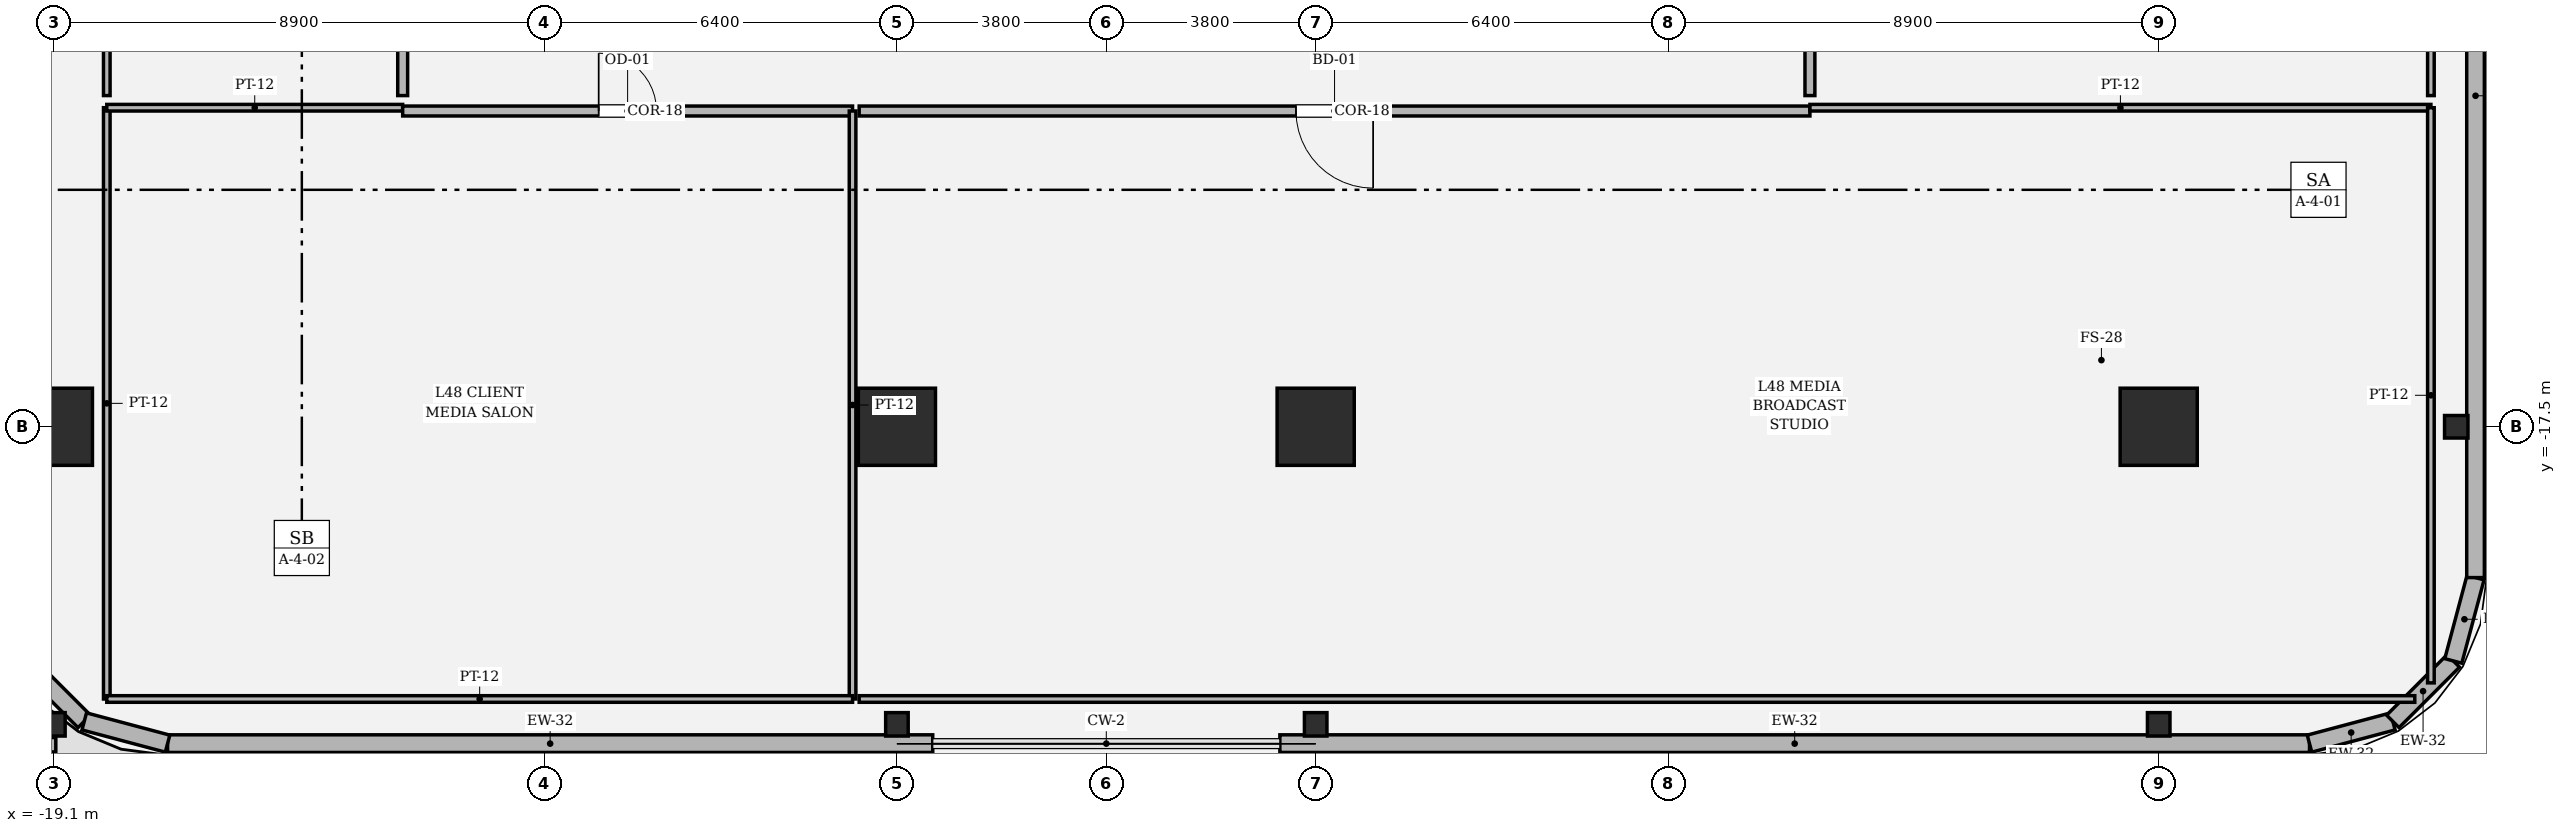
"""IFC4 building model, lengths in metres.
Left out: names, types, materials, properties, quantities, classifications, styles, units other than length and angle.
Written with IfcOpenShell. Run it as: python <this file> out.ifc"""

import sys

from ifc_helpers import new_model, si_unit, direction, frame, frame_2d, origin, origin_2d, place, context, subcontext, project, spatial, rectangle, hollow_rectangle, i_section, extrude, element, fill, save


model = new_model("IFC4")
c1 = context("Model", 3, precision=1e-05, world=origin(), true_north=direction((0.0, 1.0)))
c2 = subcontext(c1, "Body", "Model", "MODEL_VIEW")
j1 = project(units=[si_unit("LENGTHUNIT", "METRE"), si_unit("PLANEANGLEUNIT", "RADIAN")], contexts=[c1])
p1 = place(None, origin())
s1 = spatial("IfcSite", under=j1, at=p1, CompositionType="ELEMENT")
p2 = place(p1, origin())
s2 = spatial("IfcBuilding", under=s1, at=p2, CompositionType="ELEMENT")
p3 = place(p2, frame((0.0, 0.0, 204.6)))
s3 = spatial("IfcBuildingStorey", under=s2, at=p3, CompositionType="ELEMENT", Elevation=204.6)
for number, where, z_axis, x_axis in (
    (1, (-19.1, -17.5, 0.0), (0.0, 0.0, 1.0), (1.0, 0.0, 0.0)),
    (2, (-3.8, -17.5, 0.0), (0.0, 0.0, 1.0), (1.0, 0.0, 0.0)),
    (3, (3.8, -17.5, 0.0), (0.0, 0.0, 1.0), (1.0, 0.0, 0.0)),
    (4, (19.1, -17.5, 0.0), (0.0, 0.0, 1.0), (1.0, 0.0, 0.0)),
):
    element("IfcColumn", number, at=place(p3, frame(where, z_axis=z_axis, x_axis=x_axis)), inside=s3, PredefinedType="COLUMN", context=c2, shape_type="SweptSolid", body=[
        extrude(hollow_rectangle(XDim=1.4, YDim=1.4, WallThickness=0.042, at=origin_2d()), origin(), (0.0, 0.0, 1.0), 4.05),
    ])
for number, where, z_axis, x_axis in (
    (5, (-19.1, -22.9, 0.0), (0.0, 0.0, 1.0), (1.0, 0.0, 0.0)),
    (6, (-3.8, -22.9, 0.0), (0.0, 0.0, 1.0), (1.0, 0.0, 0.0)),
    (7, (3.8, -22.9, 0.0), (0.0, 0.0, 1.0), (1.0, 0.0, 0.0)),
    (8, (19.1, -22.9, 0.0), (0.0, 0.0, 1.0), (1.0, 0.0, 0.0)),
    (9, (24.5, -17.5, 0.0), (0.0, 0.0, 1.0), (0.0, 1.0, 0.0)),
):
    element("IfcColumn", number, at=place(p3, frame(where, z_axis=z_axis, x_axis=x_axis)), inside=s3, PredefinedType="COLUMN", context=c2, shape_type="SweptSolid", body=[
        extrude(i_section(OverallWidth=0.409, OverallDepth=0.425, WebThickness=0.032, FlangeThickness=0.052, FilletRadius=0.018, at=origin_2d()), origin(), (0.0, 0.0, 1.0), 4.048),
    ])
p4 = place(p3, frame((-17.037, -23.25, 0.0), z_axis=(0.0, 0.0, 1.0), x_axis=(1.0, 0.0, 0.0)))
e10 = element("IfcWall", 10, at=p4, inside=s3, PredefinedType="SOLIDWALL", context=c2, shape_type="SweptSolid", body=[
    extrude(rectangle(XDim=13.887, YDim=0.32, at=frame_2d((6.943, 0.0))), origin(), (0.0, 0.0, 1.0), 2.544),
])
p5 = place(p3, frame((3.15, -23.25, 0.0), z_axis=(0.0, 0.0, 1.0), x_axis=(1.0, 0.0, 0.0)))
e11 = element("IfcWall", 11, at=p5, inside=s3, PredefinedType="SOLIDWALL", context=c2, shape_type="SweptSolid", body=[
    extrude(rectangle(XDim=18.687, YDim=0.32, at=frame_2d((9.344, 0.0))), origin(), (0.0, 0.0, 1.0), 2.544),
])
p6 = place(p3, frame((21.837, -23.25, 0.0), z_axis=(0.0, 0.0, 1.0), x_axis=(0.966224582397, 0.257701486942, 0.0)))
e12 = element("IfcWall", 12, at=p6, inside=s3, PredefinedType="SOLIDWALL", context=c2, shape_type="SweptSolid", body=[
    extrude(rectangle(XDim=1.565, YDim=0.32, at=frame_2d((0.783, 0.0))), origin(), (0.0, 0.0, 1.0), 3.83),
])
p7 = place(p3, frame((23.349, -22.847, 0.0), z_axis=(0.0, 0.0, 1.0), x_axis=(0.707028130747, 0.707185422879, 0.0)))
e13 = element("IfcWall", 13, at=p7, inside=s3, PredefinedType="SOLIDWALL", context=c2, shape_type="SweptSolid", body=[
    extrude(rectangle(XDim=1.552, YDim=0.32, at=frame_2d((0.776, 0.0))), origin(), (0.0, 0.0, 1.0), 3.83),
])
p8 = place(p3, frame((24.447, -21.749, 0.0), z_axis=(0.0, 0.0, 1.0), x_axis=(0.257847112249, 0.966185730957, 0.0)))
e14 = element("IfcWall", 14, at=p8, inside=s3, PredefinedType="SOLIDWALL", context=c2, shape_type="SweptSolid", body=[
    extrude(rectangle(XDim=1.565, YDim=0.32, at=frame_2d((0.783, 0.0))), origin(), (0.0, 0.0, 1.0), 3.83),
])
p9 = place(p3, frame((24.85, -20.237, 0.0), z_axis=(0.0, 0.0, 1.0), x_axis=(0.0, 1.0, 0.0)))
e15 = element("IfcWall", 15, at=p9, inside=s3, PredefinedType="SOLIDWALL", context=c2, shape_type="SweptSolid", body=[
    extrude(rectangle(XDim=17.487, YDim=0.32, at=frame_2d((8.743, 0.0))), origin(), (0.0, 0.0, 1.0), 2.544),
])
p10 = place(p3, frame((-19.646, -21.749, 0.0), z_axis=(0.0, 0.0, 1.0), x_axis=(0.707028130747, -0.707185422879, 0.0)))
e16 = element("IfcWall", 16, at=p10, inside=s3, PredefinedType="SOLIDWALL", context=c2, shape_type="SweptSolid", body=[
    extrude(rectangle(XDim=1.552, YDim=0.32, at=frame_2d((0.776, 0.0))), origin(), (0.0, 0.0, 1.0), 2.504),
])
p11 = place(p3, frame((-18.549, -22.847, 0.0), z_axis=(0.0, 0.0, 1.0), x_axis=(0.966224582397, -0.257701486942, 0.0)))
e17 = element("IfcWall", 17, at=p11, inside=s3, PredefinedType="SOLIDWALL", context=c2, shape_type="SweptSolid", body=[
    extrude(rectangle(XDim=1.565, YDim=0.32, at=frame_2d((0.783, 0.0))), origin(), (0.0, 0.0, 1.0), 2.544),
])
p12 = place(p3, frame((-21.838, -23.27, 0.0), z_axis=(0.0, 0.0, 1.0), x_axis=(1.0, 0.0, 0.0)))
e18 = element("IfcWall", 18, at=p12, inside=s3, PredefinedType="PARAPET", context=c2, shape_type="SweptSolid", body=[
    extrude(rectangle(XDim=2.773, YDim=0.26, at=frame_2d((1.386, 0.0))), origin(), (0.0, 0.0, 1.0), 1.2),
])
p13 = place(p3, frame((-18.14, -22.44, 0.0), z_axis=(0.0, 0.0, 1.0), x_axis=(0.0, 1.0, 0.0)))
e19 = element("IfcWall", 19, at=p13, inside=s3, PredefinedType="PARTITIONING", context=c2, shape_type="SweptSolid", body=[
    extrude(rectangle(XDim=10.73, YDim=0.12, at=frame_2d((5.365, 0.0))), origin(), (0.0, 0.0, 1.0), 3.174),
])
p14 = place(p3, frame((-18.14, -11.71, 0.0), z_axis=(0.0, 0.0, 1.0), x_axis=(1.0, 0.0, 0.0)))
e20 = element("IfcWall", 20, at=p14, inside=s3, PredefinedType="PARTITIONING", context=c2, shape_type="SweptSolid", body=[
    extrude(rectangle(XDim=5.37, YDim=0.12, at=frame_2d((2.685, 0.0))), origin(), (0.0, 0.0, 1.0), 3.424),
])
p15 = place(p3, frame((-12.77, -11.77, 0.0), z_axis=(0.0, 0.0, 1.0), x_axis=(1.0, 0.0, 0.0)))
e21 = element("IfcWall", 21, at=p15, inside=s3, PredefinedType="PARTITIONING", context=c2, shape_type="SweptSolid", body=[
    extrude(rectangle(XDim=8.165, YDim=0.18, at=frame_2d((4.083, 0.0))), origin(), (0.0, 0.0, 1.0), 3.174),
])
p16 = place(p15, frame((3.558, 0.0, 0.0)))
e22 = element("IfcOpeningElement", 22, at=p16, cuts=e21, PredefinedType="OPENING", context=c2, shape_type="SweptSolid", body=[
    extrude(rectangle(XDim=1.05, YDim=2.2, at=frame_2d((0.525, 1.1))), frame((0.0, 0.1, 0.0), z_axis=(0.0, -1.0, 0.0), x_axis=(1.0, 0.0, 0.0)), (0.0, 0.0, 1.0), 0.2),
])
p17 = place(p3, frame((-4.605, -11.77, 0.0), z_axis=(0.0, 0.0, 1.0), x_axis=(0.0, -1.0, 0.0)))
e23 = element("IfcWall", 23, at=p17, inside=s3, PredefinedType="PARTITIONING", context=c2, shape_type="SweptSolid", body=[
    extrude(rectangle(XDim=10.67, YDim=0.12, at=frame_2d((5.335, 0.0))), origin(), (0.0, 0.0, 1.0), 3.174),
])
p18 = place(p3, frame((-4.605, -22.44, 0.0), z_axis=(0.0, 0.0, 1.0), x_axis=(-1.0, 0.0, 0.0)))
e24 = element("IfcWall", 24, at=p18, inside=s3, PredefinedType="PARTITIONING", context=c2, shape_type="SweptSolid", body=[
    extrude(rectangle(XDim=13.535, YDim=0.12, at=frame_2d((6.768, 0.0))), origin(), (0.0, 0.0, 1.0), 3.83),
])
p19 = place(p3, frame((-4.485, -11.77, 0.0), z_axis=(0.0, 0.0, 1.0), x_axis=(1.0, 0.0, 0.0)))
e25 = element("IfcWall", 25, at=p19, inside=s3, PredefinedType="PARTITIONING", context=c2, shape_type="SweptSolid", body=[
    extrude(rectangle(XDim=17.255, YDim=0.18, at=frame_2d((8.627, 0.0))), origin(), (0.0, 0.0, 1.0), 3.174),
])
p20 = place(p19, frame((7.927, 0.0, 0.0)))
e26 = element("IfcOpeningElement", 26, at=p20, cuts=e25, PredefinedType="OPENING", context=c2, shape_type="SweptSolid", body=[
    extrude(rectangle(XDim=1.4, YDim=2.25, at=frame_2d((0.7, 1.125))), frame((0.0, 0.1, 0.0), z_axis=(0.0, -1.0, 0.0), x_axis=(1.0, 0.0, 0.0)), (0.0, 0.0, 1.0), 0.2),
])
p21 = place(p3, frame((12.77, -11.71, 0.0), z_axis=(0.0, 0.0, 1.0), x_axis=(1.0, 0.0, 0.0)))
e27 = element("IfcWall", 27, at=p21, inside=s3, PredefinedType="PARTITIONING", context=c2, shape_type="SweptSolid", body=[
    extrude(rectangle(XDim=11.27, YDim=0.12, at=frame_2d((5.635, 0.0))), origin(), (0.0, 0.0, 1.0), 3.174),
])
p22 = place(p3, frame((24.04, -11.71, 0.0), z_axis=(0.0, 0.0, 1.0), x_axis=(0.0, -1.0, 0.0)))
e28 = element("IfcWall", 28, at=p22, inside=s3, PredefinedType="PARTITIONING", context=c2, shape_type="SweptSolid", body=[
    extrude(rectangle(XDim=10.438, YDim=0.12, at=frame_2d((5.219, 0.0))), origin(), (0.0, 0.0, 1.0), 2.504),
])
p23 = place(p3, frame((23.748, -22.44, 0.0), z_axis=(0.0, 0.0, 1.0), x_axis=(-1.0, 0.0, 0.0)))
e29 = element("IfcWall", 29, at=p23, inside=s3, PredefinedType="PARTITIONING", context=c2, shape_type="SweptSolid", body=[
    extrude(rectangle(XDim=28.233, YDim=0.12, at=frame_2d((14.116, 0.0))), origin(), (0.0, 0.0, 1.0), 2.504),
])
p24 = place(p3, frame((-12.77, -1.27, 0.0), z_axis=(0.0, 0.0, 1.0), x_axis=(0.0, -1.0, 0.0)))
e30 = element("IfcWall", 30, at=p24, inside=s3, PredefinedType="PARTITIONING", context=c2, shape_type="SweptSolid", body=[
    extrude(rectangle(XDim=10.22, YDim=0.18, at=frame_2d((5.11, 0.0))), origin(), (0.0, 0.0, 1.0), 3.174),
])
p25 = place(p3, frame((-18.14, -11.49, 0.0), z_axis=(0.0, 0.0, 1.0), x_axis=(0.0, 1.0, 0.0)))
e31 = element("IfcWall", 31, at=p25, inside=s3, PredefinedType="PARTITIONING", context=c2, shape_type="SweptSolid", body=[
    extrude(rectangle(XDim=10.22, YDim=0.12, at=frame_2d((5.11, 0.0))), origin(), (0.0, 0.0, 1.0), 3.174),
])
p26 = place(p3, frame((24.04, 3.74, 0.0), z_axis=(0.0, 0.0, 1.0), x_axis=(0.0, -1.0, 0.0)))
e32 = element("IfcWall", 32, at=p26, inside=s3, PredefinedType="PARTITIONING", context=c2, shape_type="SweptSolid", body=[
    extrude(rectangle(XDim=15.23, YDim=0.12, at=frame_2d((7.615, 0.0))), origin(), (0.0, 0.0, 1.0), 2.504),
])
p27 = place(p3, frame((12.77, -11.49, 0.0), z_axis=(0.0, 0.0, 1.0), x_axis=(0.0, 1.0, 0.0)))
e33 = element("IfcWall", 33, at=p27, inside=s3, PredefinedType="PARTITIONING", context=c2, shape_type="SweptSolid", body=[
    extrude(rectangle(XDim=15.23, YDim=0.18, at=frame_2d((7.615, 0.0))), origin(), (0.0, 0.0, 1.0), 3.174),
])
p28 = place(p27, frame((6.915, 0.0, 0.0)))
e34 = element("IfcOpeningElement", 34, at=p28, cuts=e33, PredefinedType="OPENING", context=c2, shape_type="SweptSolid", body=[
    extrude(rectangle(XDim=1.4, YDim=2.25, at=frame_2d((0.7, 1.125))), frame((0.0, 0.1, 0.0), z_axis=(0.0, -1.0, 0.0), x_axis=(1.0, 0.0, 0.0)), (0.0, 0.0, 1.0), 0.2),
])
p29 = place(p16, origin())
e35 = element("IfcDoor", 35, at=p29, inside=s3, OperationType="SINGLE_SWING_LEFT", PredefinedType="DOOR", context=c2, shape_type="SweptSolid", body=[
    extrude(rectangle(XDim=1.05, YDim=2.2, at=frame_2d((0.525, 1.1))), frame((0.0, 0.025, 0.0), z_axis=(0.0, -1.0, 0.0), x_axis=(1.0, 0.0, 0.0)), (0.0, 0.0, 1.0), 0.05),
])
fill(e22, e35)
p30 = place(p20, origin())
e36 = element("IfcDoor", 36, at=p30, inside=s3, OperationType="SINGLE_SWING_RIGHT", PredefinedType="DOOR", context=c2, shape_type="SweptSolid", body=[
    extrude(rectangle(XDim=1.4, YDim=2.25, at=frame_2d((0.7, 1.125))), frame((0.0, 0.025, 0.0), z_axis=(0.0, -1.0, 0.0), x_axis=(1.0, 0.0, 0.0)), (0.0, 0.0, 1.0), 0.05),
])
fill(e26, e36)
save(model, sys.argv[1])
